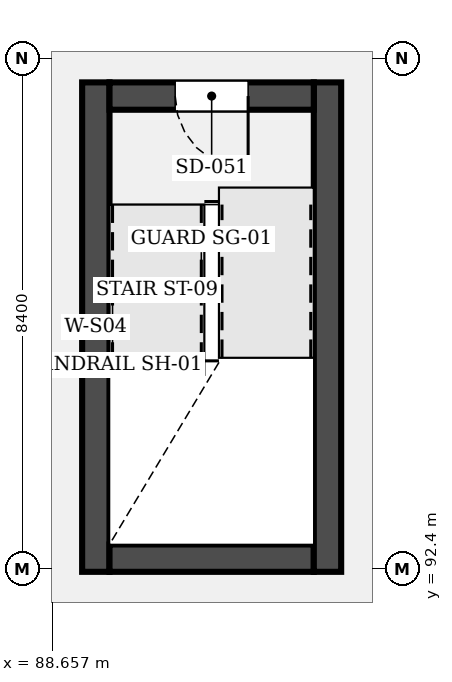
"""IFC4 building model, lengths in metres.
Left out: names, types, materials, properties, quantities, classifications, styles, units other than length and angle.
Written with IfcOpenShell. Run it as: python <this file> out.ifc"""

import sys

from ifc_helpers import new_model, si_unit, direction, frame, frame_2d, origin, place, context, subcontext, project, spatial, rectangle, extrude, element, fill, save


model = new_model("IFC4")
c1 = context("Model", 3, precision=1e-05, world=origin(), true_north=direction((0.0, 1.0)))
c2 = subcontext(c1, "Body", "Model", "MODEL_VIEW")
j1 = project(units=[si_unit("LENGTHUNIT", "METRE"), si_unit("PLANEANGLEUNIT", "RADIAN")], contexts=[c1])
p1 = place(None, origin())
s1 = spatial("IfcSite", under=j1, at=p1, CompositionType="ELEMENT")
p2 = place(p1, origin())
s2 = spatial("IfcBuilding", under=s1, at=p2, CompositionType="ELEMENT")
p3 = place(p2, frame((0.0, 0.0, 9.9)))
s3 = spatial("IfcBuildingStorey", under=s2, at=p3, CompositionType="ELEMENT", Elevation=9.9)
p4 = place(p3, frame((89.375, 100.4, 0.0), z_axis=(0.0, 0.0, 1.0), x_axis=(0.0, -1.0, 0.0)))
e1 = element("IfcWall", 1, at=p4, inside=s3, PredefinedType="SHEAR", context=c2, shape_type="SweptSolid", body=[
    extrude(rectangle(XDim=8.05, YDim=0.45, at=frame_2d((4.025, 0.0))), origin(), (0.0, 0.0, 1.0), 3.6),
])
p5 = place(p3, frame((89.6, 92.575, 0.0), z_axis=(0.0, 0.0, 1.0), x_axis=(1.0, 0.0, 0.0)))
e2 = element("IfcWall", 2, at=p5, inside=s3, PredefinedType="SHEAR", context=c2, shape_type="SweptSolid", body=[
    extrude(rectangle(XDim=3.36, YDim=0.45, at=frame_2d((1.68, 0.0))), origin(), (0.0, 0.0, 1.0), 3.6),
])
p6 = place(p3, frame((93.185, 92.35, 0.0), z_axis=(0.0, 0.0, 1.0), x_axis=(0.0, 1.0, 0.0)))
e3 = element("IfcWall", 3, at=p6, inside=s3, PredefinedType="SHEAR", context=c2, shape_type="SweptSolid", body=[
    extrude(rectangle(XDim=8.05, YDim=0.45, at=frame_2d((4.025, 0.0))), origin(), (0.0, 0.0, 1.0), 3.6),
])
p7 = place(p3, frame((92.96, 100.175, 0.0), z_axis=(0.0, 0.0, 1.0), x_axis=(-1.0, 0.0, 0.0)))
e4 = element("IfcWall", 4, at=p7, inside=s3, PredefinedType="SHEAR", context=c2, shape_type="SweptSolid", body=[
    extrude(rectangle(XDim=3.36, YDim=0.45, at=frame_2d((1.68, 0.0))), origin(), (0.0, 0.0, 1.0), 3.6),
])
p8 = place(p7, frame((1.08, 0.0, 0.0)))
e5 = element("IfcOpeningElement", 5, at=p8, cuts=e4, PredefinedType="OPENING", context=c2, shape_type="SweptSolid", body=[
    extrude(rectangle(XDim=1.2, YDim=2.2, at=frame_2d((0.6, 1.1))), frame((0.0, 0.235, 0.0), z_axis=(0.0, -1.0, 0.0), x_axis=(1.0, 0.0, 0.0)), (0.0, 0.0, 1.0), 0.47),
])
p9 = place(p8, origin())
e6 = element("IfcDoor", 6, at=p9, inside=s3, OperationType="SINGLE_SWING_LEFT", PredefinedType="DOOR", context=c2, shape_type="SweptSolid", body=[
    extrude(rectangle(XDim=1.2, YDim=2.2, at=frame_2d((0.6, 1.1))), frame((0.0, 0.025, 0.0), z_axis=(0.0, -1.0, 0.0), x_axis=(1.0, 0.0, 0.0)), (0.0, 0.0, 1.0), 0.05),
])
fill(e5, e6)
save(model, sys.argv[1])
